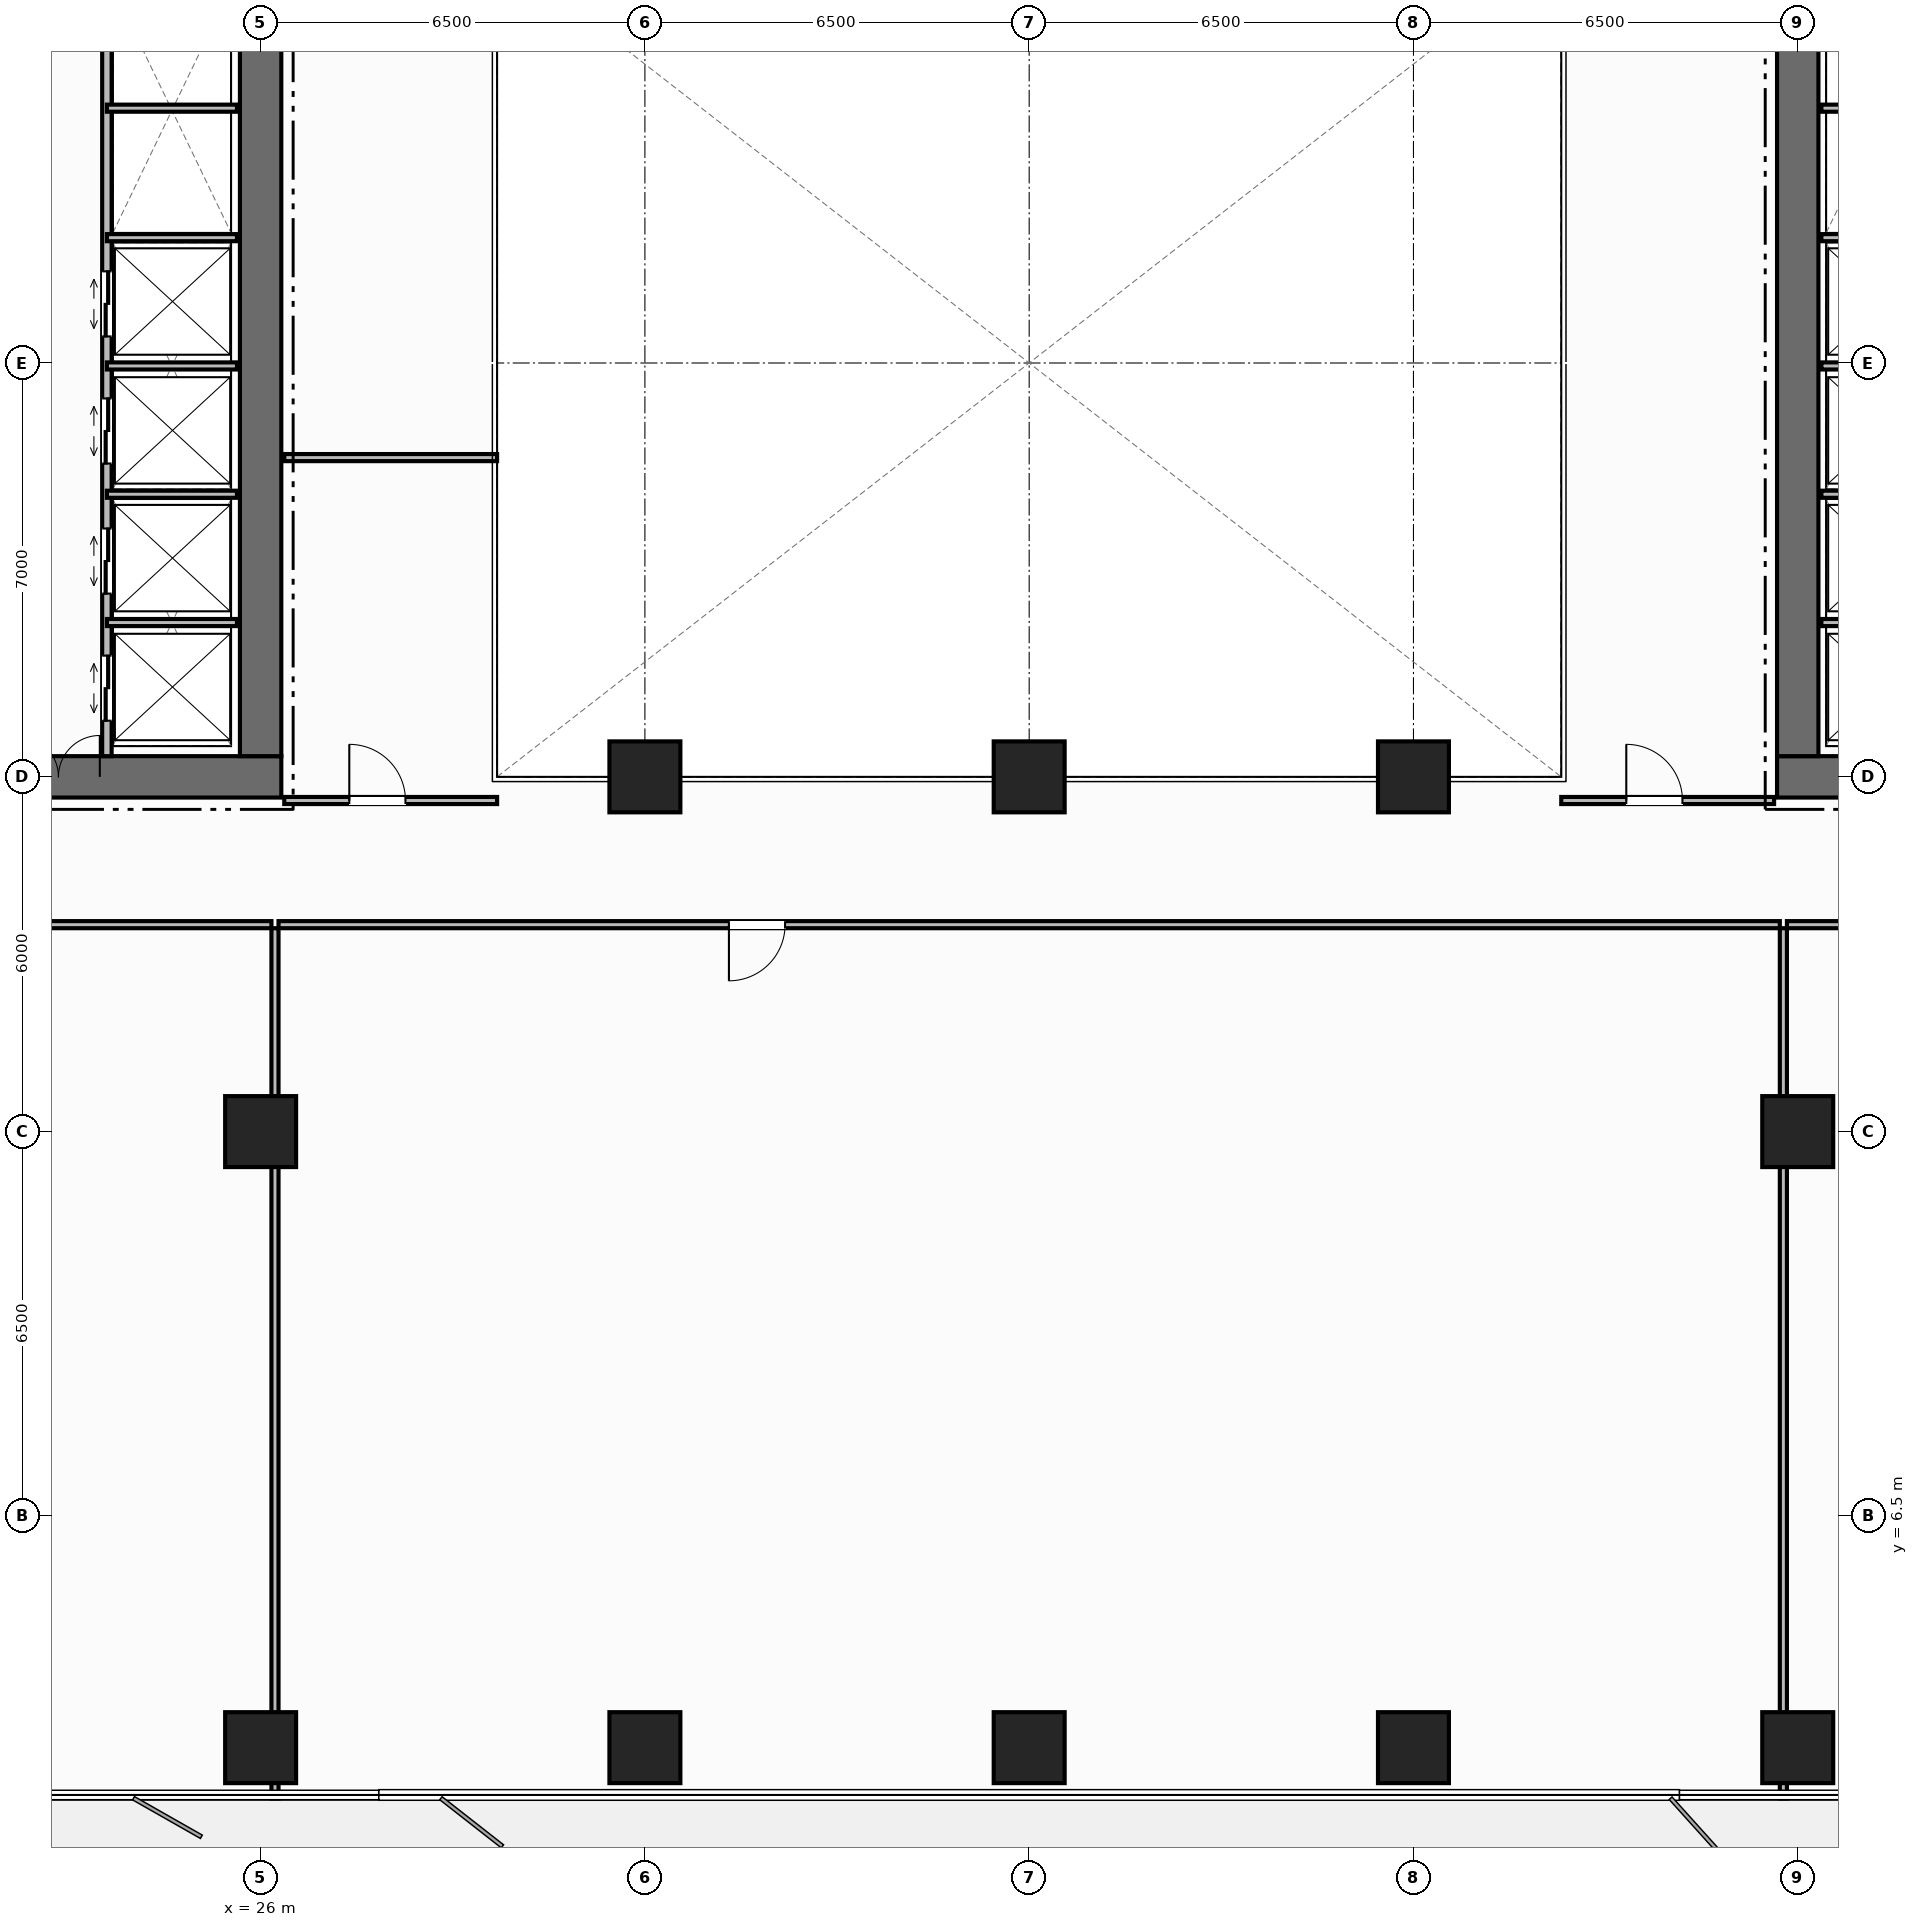
"""IFC4 building model, lengths in metres.
Left out: names, types, materials, properties, quantities, classifications, styles, units other than length and angle.
Written with IfcOpenShell. Run it as: python <this file> out.ifc"""

import sys

from ifc_helpers import new_model, si_unit, direction, frame, frame_2d, origin, origin_2d, place, context, subcontext, project, spatial, rectangle, extrude, element, fill, save


model = new_model("IFC4")
c1 = context("Model", 3, precision=1e-05, world=origin(), true_north=direction((0.0, 1.0)))
c2 = subcontext(c1, "Body", "Model", "MODEL_VIEW")
j1 = project(units=[si_unit("LENGTHUNIT", "METRE"), si_unit("PLANEANGLEUNIT", "RADIAN")], contexts=[c1])
p1 = place(None, origin())
s1 = spatial("IfcSite", under=j1, at=p1, CompositionType="ELEMENT")
p2 = place(p1, origin())
s2 = spatial("IfcBuilding", under=s1, at=p2, CompositionType="ELEMENT")
p3 = place(p2, frame((0.0, 0.0, 86.0)))
s3 = spatial("IfcBuildingStorey", under=s2, at=p3, CompositionType="ELEMENT", Elevation=86.0)
p4 = place(p3, frame((12.65, 19.0, 0.0), z_axis=(0.0, 0.0, 1.0), x_axis=(1.0, 0.0, 0.0)))
e1 = element("IfcWall", 1, at=p4, inside=s3, PredefinedType="SHEAR", context=c2, shape_type="SweptSolid", body=[
    extrude(rectangle(XDim=13.7, YDim=0.7, at=frame_2d((6.85, 0.0))), origin(), (0.0, 0.0, 1.0), 3.8),
])
p5 = place(p4, frame((9.23, 0.0, 0.0)))
e2 = element("IfcOpeningElement", 2, at=p5, cuts=e1, PredefinedType="OPENING", context=c2, shape_type="SweptSolid", body=[
    extrude(rectangle(XDim=1.4, YDim=2.2, at=frame_2d((0.7, 1.1))), frame((0.0, 0.36, 0.0), z_axis=(0.0, -1.0, 0.0), x_axis=(1.0, 0.0, 0.0)), (0.0, 0.0, 1.0), 0.72),
])
p6 = place(p3, frame((26.0, 19.35, 0.0), z_axis=(0.0, 0.0, 1.0), x_axis=(0.0, 1.0, 0.0)))
e3 = element("IfcWall", 3, at=p6, inside=s3, PredefinedType="SHEAR", context=c2, shape_type="SweptSolid", body=[
    extrude(rectangle(XDim=13.3, YDim=0.7, at=frame_2d((6.65, 0.0))), origin(), (0.0, 0.0, 1.0), 3.8),
])
p7 = place(p3, frame((51.65, 19.0, 0.0), z_axis=(0.0, 0.0, 1.0), x_axis=(1.0, 0.0, 0.0)))
e4 = element("IfcWall", 4, at=p7, inside=s3, PredefinedType="SHEAR", context=c2, shape_type="SweptSolid", body=[
    extrude(rectangle(XDim=13.7, YDim=0.7, at=frame_2d((6.85, 0.0))), origin(), (0.0, 0.0, 1.0), 3.8),
])
p8 = place(p7, frame((3.07, 0.0, 0.0)))
e5 = element("IfcOpeningElement", 5, at=p8, cuts=e4, PredefinedType="OPENING", context=c2, shape_type="SweptSolid", body=[
    extrude(rectangle(XDim=1.4, YDim=2.2, at=frame_2d((0.7, 1.1))), frame((0.0, 0.36, 0.0), z_axis=(0.0, -1.0, 0.0), x_axis=(1.0, 0.0, 0.0)), (0.0, 0.0, 1.0), 0.72),
])
p9 = place(p3, frame((52.0, 19.35, 0.0), z_axis=(0.0, 0.0, 1.0), x_axis=(0.0, 1.0, 0.0)))
e6 = element("IfcWall", 6, at=p9, inside=s3, PredefinedType="SHEAR", context=c2, shape_type="SweptSolid", body=[
    extrude(rectangle(XDim=13.3, YDim=0.7, at=frame_2d((6.65, 0.0))), origin(), (0.0, 0.0, 1.0), 3.8),
])
for number, where, z_axis, x_axis in (
    (7, (32.5, 19.0, 0.0), (0.0, 0.0, 1.0), (1.0, 0.0, 0.0)),
    (8, (39.0, 19.0, 0.0), (0.0, 0.0, 1.0), (1.0, 0.0, 0.0)),
    (9, (45.5, 19.0, 0.0), (0.0, 0.0, 1.0), (1.0, 0.0, 0.0)),
    (10, (26.0, 13.0, 0.0), (0.0, 0.0, 1.0), (1.0, 0.0, 0.0)),
    (11, (52.0, 13.0, 0.0), (0.0, 0.0, 1.0), (1.0, 0.0, 0.0)),
    (12, (26.0, 2.58, 0.0), (0.0, 0.0, 1.0), (1.0, 0.0, 0.0)),
    (13, (32.5, 2.58, 0.0), (0.0, 0.0, 1.0), (1.0, 0.0, 0.0)),
    (14, (39.0, 2.58, 0.0), (0.0, 0.0, 1.0), (1.0, 0.0, 0.0)),
    (15, (45.5, 2.58, 0.0), (0.0, 0.0, 1.0), (1.0, 0.0, 0.0)),
    (16, (52.0, 2.58, 0.0), (0.0, 0.0, 1.0), (1.0, 0.0, 0.0)),
):
    element("IfcColumn", number, at=place(p3, frame(where, z_axis=z_axis, x_axis=x_axis)), inside=s3, PredefinedType="COLUMN", context=c2, shape_type="SweptSolid", body=[
        extrude(rectangle(XDim=1.2, YDim=1.2, at=origin_2d()), origin(), (0.0, 0.0, 1.0), 3.8),
    ])
p10 = place(p3, frame((23.4, 19.35, 0.0), z_axis=(0.0, 0.0, 1.0), x_axis=(0.0, 1.0, 0.0)))
e17 = element("IfcWall", 17, at=p10, inside=s3, PredefinedType="STANDARD", context=c2, shape_type="SweptSolid", body=[
    extrude(rectangle(XDim=13.3, YDim=0.16, at=frame_2d((6.65, 0.0))), origin(), (0.0, 0.0, 1.0), 3.565),
])
p11 = place(p10, frame((0.6, 0.0, 0.0)))
e18 = element("IfcOpeningElement", 18, at=p11, cuts=e17, PredefinedType="OPENING", context=c2, shape_type="SweptSolid", body=[
    extrude(rectangle(XDim=1.1, YDim=2.2, at=frame_2d((0.55, 1.1))), frame((0.0, 0.09, 0.0), z_axis=(0.0, -1.0, 0.0), x_axis=(1.0, 0.0, 0.0)), (0.0, 0.0, 1.0), 0.18),
])
p12 = place(p10, frame((2.75, 0.0, 0.0)))
e19 = element("IfcOpeningElement", 19, at=p12, cuts=e17, PredefinedType="OPENING", context=c2, shape_type="SweptSolid", body=[
    extrude(rectangle(XDim=1.1, YDim=2.2, at=frame_2d((0.55, 1.1))), frame((0.0, 0.09, 0.0), z_axis=(0.0, -1.0, 0.0), x_axis=(1.0, 0.0, 0.0)), (0.0, 0.0, 1.0), 0.18),
])
p13 = place(p10, frame((4.95, 0.0, 0.0)))
e20 = element("IfcOpeningElement", 20, at=p13, cuts=e17, PredefinedType="OPENING", context=c2, shape_type="SweptSolid", body=[
    extrude(rectangle(XDim=1.1, YDim=2.2, at=frame_2d((0.55, 1.1))), frame((0.0, 0.09, 0.0), z_axis=(0.0, -1.0, 0.0), x_axis=(1.0, 0.0, 0.0)), (0.0, 0.0, 1.0), 0.18),
])
p14 = place(p10, frame((7.1, 0.0, 0.0)))
e21 = element("IfcOpeningElement", 21, at=p14, cuts=e17, PredefinedType="OPENING", context=c2, shape_type="SweptSolid", body=[
    extrude(rectangle(XDim=1.1, YDim=2.2, at=frame_2d((0.55, 1.1))), frame((0.0, 0.09, 0.0), z_axis=(0.0, -1.0, 0.0), x_axis=(1.0, 0.0, 0.0)), (0.0, 0.0, 1.0), 0.18),
])
for number, where, z_axis, x_axis in (
    (22, (23.4, 21.61, 0.0), (0.0, 0.0, 1.0), (1.0, 0.0, 0.0)),
    (23, (23.4, 23.78, 0.0), (0.0, 0.0, 1.0), (1.0, 0.0, 0.0)),
    (24, (23.4, 25.95, 0.0), (0.0, 0.0, 1.0), (1.0, 0.0, 0.0)),
    (25, (23.4, 28.12, 0.0), (0.0, 0.0, 1.0), (1.0, 0.0, 0.0)),
    (26, (23.4, 30.31, 0.0), (0.0, 0.0, 1.0), (1.0, 0.0, 0.0)),
    (27, (52.4, 21.61, 0.0), (0.0, 0.0, 1.0), (1.0, 0.0, 0.0)),
    (28, (52.4, 23.78, 0.0), (0.0, 0.0, 1.0), (1.0, 0.0, 0.0)),
    (29, (52.4, 25.95, 0.0), (0.0, 0.0, 1.0), (1.0, 0.0, 0.0)),
    (30, (52.4, 28.12, 0.0), (0.0, 0.0, 1.0), (1.0, 0.0, 0.0)),
    (31, (52.4, 30.31, 0.0), (0.0, 0.0, 1.0), (1.0, 0.0, 0.0)),
):
    element("IfcWall", number, at=place(p3, frame(where, z_axis=z_axis, x_axis=x_axis)), inside=s3, PredefinedType="PARTITIONING", context=c2, shape_type="SweptSolid", body=[
        extrude(rectangle(XDim=2.2, YDim=0.12, at=frame_2d((1.1, 0.0))), origin(), (0.0, 0.0, 1.0), 3.565),
    ])
p15 = place(p3, frame((26.4, 24.4, 0.0), z_axis=(0.0, 0.0, 1.0), x_axis=(1.0, 0.0, 0.0)))
e32 = element("IfcWall", 32, at=p15, inside=s3, PredefinedType="PARTITIONING", context=c2, shape_type="SweptSolid", body=[
    extrude(rectangle(XDim=3.6, YDim=0.12, at=frame_2d((1.8, 0.0))), origin(), (0.0, 0.0, 1.0), 3.565),
])
p16 = place(p3, frame((26.4, 18.6, 0.0), z_axis=(0.0, 0.0, 1.0), x_axis=(1.0, 0.0, 0.0)))
e33 = element("IfcWall", 33, at=p16, inside=s3, PredefinedType="PARTITIONING", context=c2, shape_type="SweptSolid", body=[
    extrude(rectangle(XDim=3.6, YDim=0.12, at=frame_2d((1.8, 0.0))), origin(), (0.0, 0.0, 1.0), 3.565),
])
p17 = place(p16, frame((1.1, 0.0, 0.0)))
e34 = element("IfcOpeningElement", 34, at=p17, cuts=e33, PredefinedType="OPENING", context=c2, shape_type="SweptSolid", body=[
    extrude(rectangle(XDim=0.95, YDim=2.15, at=frame_2d((0.475, 1.075))), frame((0.0, 0.07, 0.0), z_axis=(0.0, -1.0, 0.0), x_axis=(1.0, 0.0, 0.0)), (0.0, 0.0, 1.0), 0.14),
])
p18 = place(p3, frame((48.0, 18.6, 0.0), z_axis=(0.0, 0.0, 1.0), x_axis=(1.0, 0.0, 0.0)))
e35 = element("IfcWall", 35, at=p18, inside=s3, PredefinedType="PARTITIONING", context=c2, shape_type="SweptSolid", body=[
    extrude(rectangle(XDim=3.6, YDim=0.12, at=frame_2d((1.8, 0.0))), origin(), (0.0, 0.0, 1.0), 3.565),
])
p19 = place(p18, frame((1.1, 0.0, 0.0)))
e36 = element("IfcOpeningElement", 36, at=p19, cuts=e35, PredefinedType="OPENING", context=c2, shape_type="SweptSolid", body=[
    extrude(rectangle(XDim=0.95, YDim=2.15, at=frame_2d((0.475, 1.075))), frame((0.0, 0.07, 0.0), z_axis=(0.0, -1.0, 0.0), x_axis=(1.0, 0.0, 0.0)), (0.0, 0.0, 1.0), 0.14),
])
p20 = place(p3, frame((26.243, 1.72, 0.0), z_axis=(0.0, 0.0, 1.0), x_axis=(0.0, 1.0, 0.0)))
e37 = element("IfcWall", 37, at=p20, inside=s3, PredefinedType="PARTITIONING", context=c2, shape_type="SweptSolid", body=[
    extrude(rectangle(XDim=14.72, YDim=0.12, at=frame_2d((7.36, 0.0))), origin(), (0.0, 0.0, 1.0), 3.565),
])
p21 = place(p3, frame((1.98, 16.5, 0.0), z_axis=(0.0, 0.0, 1.0), x_axis=(1.0, 0.0, 0.0)))
e38 = element("IfcWall", 38, at=p21, inside=s3, PredefinedType="PARTITIONING", context=c2, shape_type="SweptSolid", body=[
    extrude(rectangle(XDim=24.203, YDim=0.12, at=frame_2d((12.102, 0.0))), origin(), (0.0, 0.0, 1.0), 3.565),
])
p22 = place(p21, frame((8.9, 0.0, 0.0)))
e39 = element("IfcOpeningElement", 39, at=p22, cuts=e38, PredefinedType="OPENING", context=c2, shape_type="SweptSolid", body=[
    extrude(rectangle(XDim=0.95, YDim=2.15, at=frame_2d((0.475, 1.075))), frame((0.0, 0.07, 0.0), z_axis=(0.0, -1.0, 0.0), x_axis=(1.0, 0.0, 0.0)), (0.0, 0.0, 1.0), 0.14),
])
p23 = place(p3, frame((51.757, 1.72, 0.0), z_axis=(0.0, 0.0, 1.0), x_axis=(0.0, 1.0, 0.0)))
e40 = element("IfcWall", 40, at=p23, inside=s3, PredefinedType="PARTITIONING", context=c2, shape_type="SweptSolid", body=[
    extrude(rectangle(XDim=14.72, YDim=0.12, at=frame_2d((7.36, 0.0))), origin(), (0.0, 0.0, 1.0), 3.565),
])
p24 = place(p3, frame((26.303, 16.5, 0.0), z_axis=(0.0, 0.0, 1.0), x_axis=(1.0, 0.0, 0.0)))
e41 = element("IfcWall", 41, at=p24, inside=s3, PredefinedType="PARTITIONING", context=c2, shape_type="SweptSolid", body=[
    extrude(rectangle(XDim=25.394, YDim=0.12, at=frame_2d((12.697, 0.0))), origin(), (0.0, 0.0, 1.0), 3.565),
])
p25 = place(p24, frame((7.618, 0.0, 0.0)))
e42 = element("IfcOpeningElement", 42, at=p25, cuts=e41, PredefinedType="OPENING", context=c2, shape_type="SweptSolid", body=[
    extrude(rectangle(XDim=0.95, YDim=2.15, at=frame_2d((0.475, 1.075))), frame((0.0, 0.07, 0.0), z_axis=(0.0, -1.0, 0.0), x_axis=(1.0, 0.0, 0.0)), (0.0, 0.0, 1.0), 0.14),
])
p26 = place(p3, frame((51.817, 16.5, 0.0), z_axis=(0.0, 0.0, 1.0), x_axis=(1.0, 0.0, 0.0)))
e43 = element("IfcWall", 43, at=p26, inside=s3, PredefinedType="PARTITIONING", context=c2, shape_type="SweptSolid", body=[
    extrude(rectangle(XDim=24.203, YDim=0.12, at=frame_2d((12.102, 0.0))), origin(), (0.0, 0.0, 1.0), 3.565),
])
p27 = place(p26, frame((14.353, 0.0, 0.0)))
e44 = element("IfcOpeningElement", 44, at=p27, cuts=e43, PredefinedType="OPENING", context=c2, shape_type="SweptSolid", body=[
    extrude(rectangle(XDim=0.95, YDim=2.15, at=frame_2d((0.475, 1.075))), frame((0.0, 0.07, 0.0), z_axis=(0.0, -1.0, 0.0), x_axis=(1.0, 0.0, 0.0)), (0.0, 0.0, 1.0), 0.14),
])
p28 = place(p5, origin())
e45 = element("IfcDoor", 45, at=p28, inside=s3, OperationType="DOUBLE_DOOR_SINGLE_SWING", PredefinedType="DOOR", context=c2, shape_type="SweptSolid", body=[
    extrude(rectangle(XDim=1.4, YDim=2.2, at=frame_2d((0.7, 1.1))), frame((0.0, 0.125, 0.0), z_axis=(0.0, -1.0, 0.0), x_axis=(1.0, 0.0, 0.0)), (0.0, 0.0, 1.0), 0.05),
])
fill(e2, e45)
p29 = place(p11, origin())
e46 = element("IfcDoor", 46, at=p29, inside=s3, OperationType="DOUBLE_DOOR_SLIDING", PredefinedType="DOOR", context=c2, shape_type="SweptSolid", body=[
    extrude(rectangle(XDim=1.1, YDim=2.2, at=frame_2d((0.55, 1.1))), frame((0.0, 0.025, 0.0), z_axis=(0.0, -1.0, 0.0), x_axis=(1.0, 0.0, 0.0)), (0.0, 0.0, 1.0), 0.05),
])
fill(e18, e46)
p30 = place(p12, origin())
e47 = element("IfcDoor", 47, at=p30, inside=s3, OperationType="DOUBLE_DOOR_SLIDING", PredefinedType="DOOR", context=c2, shape_type="SweptSolid", body=[
    extrude(rectangle(XDim=1.1, YDim=2.2, at=frame_2d((0.55, 1.1))), frame((0.0, 0.025, 0.0), z_axis=(0.0, -1.0, 0.0), x_axis=(1.0, 0.0, 0.0)), (0.0, 0.0, 1.0), 0.05),
])
fill(e19, e47)
p31 = place(p13, origin())
e48 = element("IfcDoor", 48, at=p31, inside=s3, OperationType="DOUBLE_DOOR_SLIDING", PredefinedType="DOOR", context=c2, shape_type="SweptSolid", body=[
    extrude(rectangle(XDim=1.1, YDim=2.2, at=frame_2d((0.55, 1.1))), frame((0.0, 0.025, 0.0), z_axis=(0.0, -1.0, 0.0), x_axis=(1.0, 0.0, 0.0)), (0.0, 0.0, 1.0), 0.05),
])
fill(e20, e48)
p32 = place(p14, origin())
e49 = element("IfcDoor", 49, at=p32, inside=s3, OperationType="DOUBLE_DOOR_SLIDING", PredefinedType="DOOR", context=c2, shape_type="SweptSolid", body=[
    extrude(rectangle(XDim=1.1, YDim=2.2, at=frame_2d((0.55, 1.1))), frame((0.0, 0.025, 0.0), z_axis=(0.0, -1.0, 0.0), x_axis=(1.0, 0.0, 0.0)), (0.0, 0.0, 1.0), 0.05),
])
fill(e21, e49)
p33 = place(p17, origin())
e50 = element("IfcDoor", 50, at=p33, inside=s3, OperationType="SINGLE_SWING_LEFT", PredefinedType="DOOR", context=c2, shape_type="SweptSolid", body=[
    extrude(rectangle(XDim=0.95, YDim=2.15, at=frame_2d((0.475, 1.075))), frame((0.0, 0.025, 0.0), z_axis=(0.0, -1.0, 0.0), x_axis=(1.0, 0.0, 0.0)), (0.0, 0.0, 1.0), 0.05),
])
fill(e34, e50)
p34 = place(p19, origin())
e51 = element("IfcDoor", 51, at=p34, inside=s3, OperationType="SINGLE_SWING_LEFT", PredefinedType="DOOR", context=c2, shape_type="SweptSolid", body=[
    extrude(rectangle(XDim=0.95, YDim=2.15, at=frame_2d((0.475, 1.075))), frame((0.0, 0.025, 0.0), z_axis=(0.0, -1.0, 0.0), x_axis=(1.0, 0.0, 0.0)), (0.0, 0.0, 1.0), 0.05),
])
fill(e36, e51)
p35 = place(p25, origin())
e52 = element("IfcDoor", 52, at=p35, inside=s3, OperationType="SINGLE_SWING_RIGHT", PredefinedType="DOOR", context=c2, shape_type="SweptSolid", body=[
    extrude(rectangle(XDim=0.95, YDim=2.15, at=frame_2d((0.475, 1.075))), frame((0.0, 0.025, 0.0), z_axis=(0.0, -1.0, 0.0), x_axis=(1.0, 0.0, 0.0)), (0.0, 0.0, 1.0), 0.05),
])
fill(e42, e52)
save(model, sys.argv[1])
